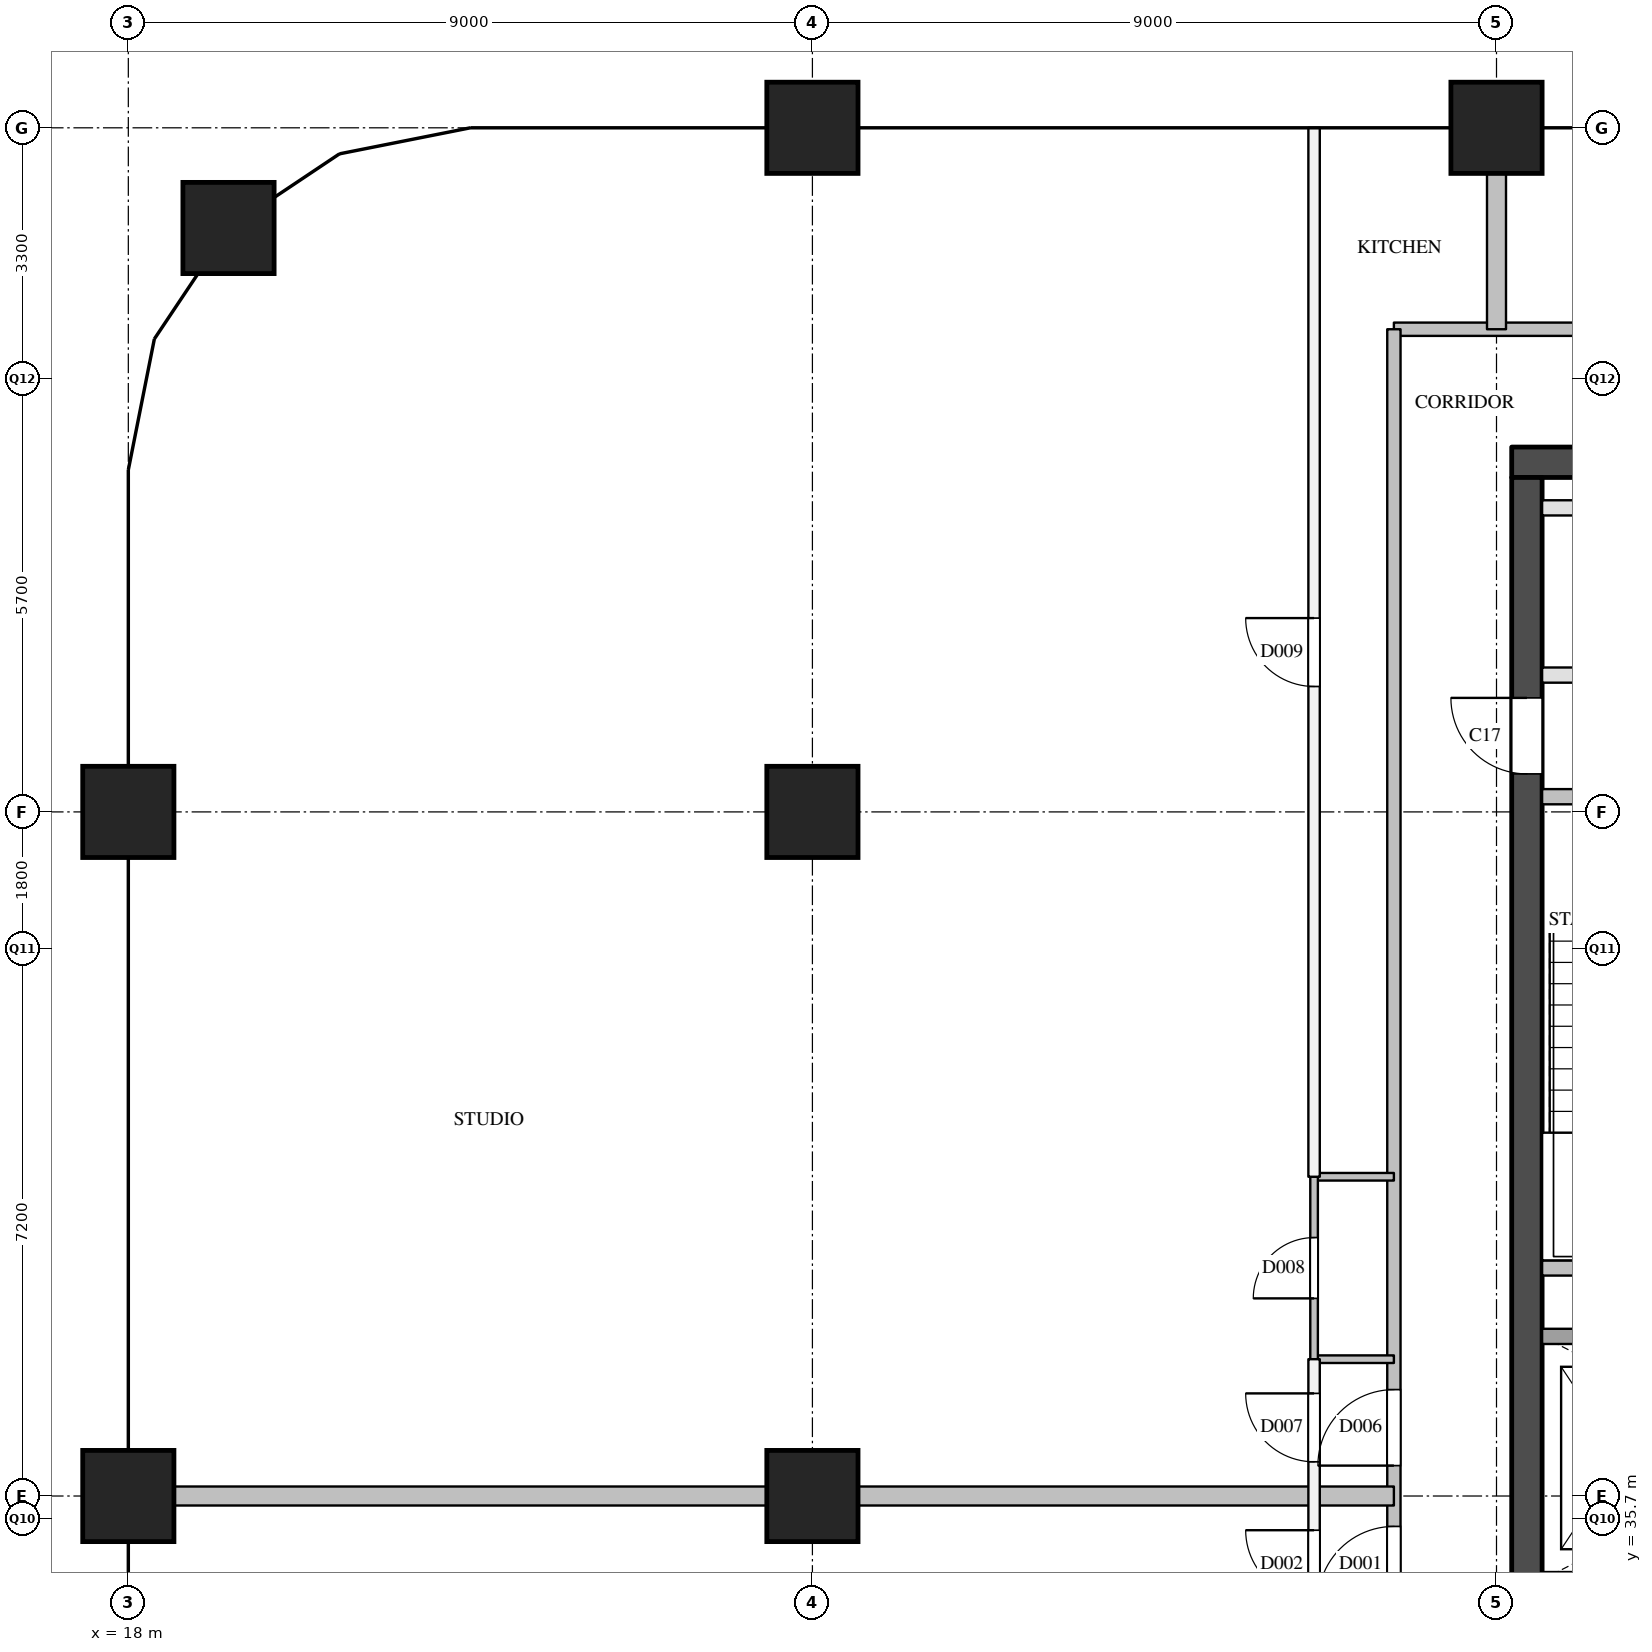
"""IFC4 building model, lengths in metres.
Left out: names, types, materials, properties, quantities, classifications, styles, units other than length and angle.
Written with IfcOpenShell. Run it as: python <this file> out.ifc"""

import sys

from ifc_helpers import new_model, si_unit, direction, frame, frame_2d, origin, origin_2d, place, context, subcontext, project, spatial, rectangle, extrude, element, fill, save


model = new_model("IFC4")
c1 = context("Model", 3, precision=1e-05, world=origin(), true_north=direction((0.0, 1.0)))
c2 = subcontext(c1, "Body", "Model", "MODEL_VIEW")
j1 = project(units=[si_unit("LENGTHUNIT", "METRE"), si_unit("PLANEANGLEUNIT", "RADIAN")], contexts=[c1])
p1 = place(None, origin())
s1 = spatial("IfcSite", under=j1, at=p1, CompositionType="ELEMENT")
p2 = place(p1, origin())
s2 = spatial("IfcBuilding", under=s1, at=p2, CompositionType="ELEMENT")
p3 = place(p2, frame((0.0, 0.0, 273.5)))
s3 = spatial("IfcBuildingStorey", under=s2, at=p3, CompositionType="ELEMENT", Elevation=273.5)
for number, where, z_axis, x_axis in (
    (1, (18.0, 36.0, 0.0), (0.0, 0.0, 1.0), (1.0, 0.0, 0.0)),
    (2, (18.0, 45.0, 0.0), (0.0, 0.0, 1.0), (1.0, 0.0, 0.0)),
    (3, (19.318, 52.682, 0.0), (0.0, 0.0, 1.0), (1.0, 0.0, 0.0)),
    (4, (27.0, 36.0, 0.0), (0.0, 0.0, 1.0), (1.0, 0.0, 0.0)),
    (5, (27.0, 45.0, 0.0), (0.0, 0.0, 1.0), (1.0, 0.0, 0.0)),
    (6, (27.0, 54.0, 0.0), (0.0, 0.0, 1.0), (1.0, 0.0, 0.0)),
    (7, (36.0, 54.0, 0.0), (0.0, 0.0, 1.0), (1.0, 0.0, 0.0)),
):
    element("IfcColumn", number, at=place(p3, frame(where, z_axis=z_axis, x_axis=x_axis)), inside=s3, PredefinedType="COLUMN", context=c2, shape_type="SweptSolid", body=[
        extrude(rectangle(XDim=1.2, YDim=1.2, at=origin_2d()), origin(), (0.0, 0.0, 1.0), 3.9),
    ])
p4 = place(p3, frame((36.2, 49.6, 0.0), z_axis=(0.0, 0.0, 1.0), x_axis=(1.0, 0.0, 0.0)))
e8 = element("IfcWall", 8, at=p4, inside=s3, PredefinedType="SHEAR", context=c2, shape_type="SweptSolid", body=[
    extrude(rectangle(XDim=12.0, YDim=0.4, at=frame_2d((6.0, 0.0))), origin(), (0.0, 0.0, 1.0), 3.6),
])
p5 = place(p3, frame((36.4, 29.1, 0.0), z_axis=(0.0, 0.0, 1.0), x_axis=(0.0, 1.0, 0.0)))
e9 = element("IfcWall", 9, at=p5, inside=s3, PredefinedType="SHEAR", context=c2, shape_type="SweptSolid", body=[
    extrude(rectangle(XDim=20.3, YDim=0.4, at=frame_2d((10.15, 0.0))), origin(), (0.0, 0.0, 1.0), 3.6),
])
p6 = place(p5, frame((3.6, 0.0, 0.0)))
e10 = element("IfcOpeningElement", 10, at=p6, cuts=e9, PredefinedType="OPENING", context=c2, shape_type="SweptSolid", body=[
    extrude(rectangle(XDim=1.8, YDim=2.1, at=frame_2d((0.9, 1.05))), frame((0.0, 0.21, 0.0), z_axis=(0.0, -1.0, 0.0), x_axis=(1.0, 0.0, 0.0)), (0.0, 0.0, 1.0), 0.42),
])
p7 = place(p5, frame((16.4, 0.0, 0.0)))
e11 = element("IfcOpeningElement", 11, at=p7, cuts=e9, PredefinedType="OPENING", context=c2, shape_type="SweptSolid", body=[
    extrude(rectangle(XDim=1.0, YDim=2.1, at=frame_2d((0.5, 1.05))), frame((0.0, 0.21, 0.0), z_axis=(0.0, -1.0, 0.0), x_axis=(1.0, 0.0, 0.0)), (0.0, 0.0, 1.0), 0.42),
])
p8 = place(p3, frame((36.6, 38.1, 0.0), z_axis=(0.0, 0.0, 1.0), x_axis=(1.0, 0.0, 0.0)))
e12 = element("IfcWall", 12, at=p8, inside=s3, PredefinedType="SOLIDWALL", context=c2, shape_type="SweptSolid", body=[
    extrude(rectangle(XDim=6.7, YDim=0.2, at=frame_2d((3.35, 0.0))), origin(), (0.0, 0.0, 1.0), 3.6),
])
p9 = place(p8, frame((0.45, 0.0, 0.0)))
e13 = element("IfcOpeningElement", 13, at=p9, cuts=e12, PredefinedType="OPENING", context=c2, shape_type="SweptSolid", body=[
    extrude(rectangle(XDim=1.2, YDim=2.1, at=frame_2d((0.6, 1.05))), frame((0.0, 0.11, 0.0), z_axis=(0.0, -1.0, 0.0), x_axis=(1.0, 0.0, 0.0)), (0.0, 0.0, 1.0), 0.22),
])
p10 = place(p8, frame((2.55, 0.0, 0.0)))
e14 = element("IfcOpeningElement", 14, at=p10, cuts=e12, PredefinedType="OPENING", context=c2, shape_type="SweptSolid", body=[
    extrude(rectangle(XDim=1.2, YDim=2.1, at=frame_2d((0.6, 1.05))), frame((0.0, 0.11, 0.0), z_axis=(0.0, -1.0, 0.0), x_axis=(1.0, 0.0, 0.0)), (0.0, 0.0, 1.0), 0.22),
])
p11 = place(p8, frame((4.65, 0.0, 0.0)))
e15 = element("IfcOpeningElement", 15, at=p11, cuts=e12, PredefinedType="OPENING", context=c2, shape_type="SweptSolid", body=[
    extrude(rectangle(XDim=1.2, YDim=2.1, at=frame_2d((0.6, 1.05))), frame((0.0, 0.11, 0.0), z_axis=(0.0, -1.0, 0.0), x_axis=(1.0, 0.0, 0.0)), (0.0, 0.0, 1.0), 0.22),
])
p12 = place(p3, frame((36.6, 39.0, 0.0), z_axis=(0.0, 0.0, 1.0), x_axis=(1.0, 0.0, 0.0)))
e16 = element("IfcWall", 16, at=p12, inside=s3, PredefinedType="SOLIDWALL", context=c2, shape_type="SweptSolid", body=[
    extrude(rectangle(XDim=3.25, YDim=0.2, at=frame_2d((1.625, 0.0))), origin(), (0.0, 0.0, 1.0), 3.6),
])
p13 = place(p3, frame((36.6, 45.2, 0.0), z_axis=(0.0, 0.0, 1.0), x_axis=(1.0, 0.0, 0.0)))
e17 = element("IfcWall", 17, at=p13, inside=s3, PredefinedType="SOLIDWALL", context=c2, shape_type="SweptSolid", body=[
    extrude(rectangle(XDim=10.05, YDim=0.2, at=frame_2d((5.025, 0.0))), origin(), (0.0, 0.0, 1.0), 3.6),
])
p14 = place(p13, frame((1.125, 0.0, 0.0)))
e18 = element("IfcOpeningElement", 18, at=p14, cuts=e17, PredefinedType="OPENING", context=c2, shape_type="SweptSolid", body=[
    extrude(rectangle(XDim=1.1, YDim=2.1, at=frame_2d((0.55, 1.05))), frame((0.0, 0.11, 0.0), z_axis=(0.0, -1.0, 0.0), x_axis=(1.0, 0.0, 0.0)), (0.0, 0.0, 1.0), 0.22),
])
p15 = place(p13, frame((4.475, 0.0, 0.0)))
e19 = element("IfcOpeningElement", 19, at=p15, cuts=e17, PredefinedType="OPENING", context=c2, shape_type="SweptSolid", body=[
    extrude(rectangle(XDim=1.1, YDim=2.1, at=frame_2d((0.55, 1.05))), frame((0.0, 0.11, 0.0), z_axis=(0.0, -1.0, 0.0), x_axis=(1.0, 0.0, 0.0)), (0.0, 0.0, 1.0), 0.22),
])
p16 = place(p13, frame((7.825, 0.0, 0.0)))
e20 = element("IfcOpeningElement", 20, at=p16, cuts=e17, PredefinedType="OPENING", context=c2, shape_type="SweptSolid", body=[
    extrude(rectangle(XDim=1.1, YDim=2.1, at=frame_2d((0.55, 1.05))), frame((0.0, 0.11, 0.0), z_axis=(0.0, -1.0, 0.0), x_axis=(1.0, 0.0, 0.0)), (0.0, 0.0, 1.0), 0.22),
])
p17 = place(p3, frame((36.6, 46.8, 0.0), z_axis=(0.0, 0.0, 1.0), x_axis=(1.0, 0.0, 0.0)))
e21 = element("IfcWall", 21, at=p17, inside=s3, PredefinedType="PARTITIONING", context=c2, shape_type="SweptSolid", body=[
    extrude(rectangle(XDim=11.2, YDim=0.2, at=frame_2d((5.6, 0.0))), origin(), (0.0, 0.0, 1.0), 3.6),
])
p18 = place(p17, frame((5.15, 0.0, 0.0)))
e22 = element("IfcOpeningElement", 22, at=p18, cuts=e21, PredefinedType="OPENING", context=c2, shape_type="SweptSolid", body=[
    extrude(rectangle(XDim=0.9, YDim=2.1, at=frame_2d((0.45, 1.05))), frame((0.0, 0.11, 0.0), z_axis=(0.0, -1.0, 0.0), x_axis=(1.0, 0.0, 0.0)), (0.0, 0.0, 1.0), 0.22),
])
p19 = place(p3, frame((36.6, 49.0, 0.0), z_axis=(0.0, 0.0, 1.0), x_axis=(1.0, 0.0, 0.0)))
e23 = element("IfcWall", 23, at=p19, inside=s3, PredefinedType="PARTITIONING", context=c2, shape_type="SweptSolid", body=[
    extrude(rectangle(XDim=11.2, YDim=0.2, at=frame_2d((5.6, 0.0))), origin(), (0.0, 0.0, 1.0), 3.6),
])
p20 = place(p3, frame((34.65, 51.35, 0.0), z_axis=(0.0, 0.0, 1.0), x_axis=(1.0, 0.0, 0.0)))
e24 = element("IfcWall", 24, at=p20, inside=s3, PredefinedType="PARTITIONING", context=c2, shape_type="SweptSolid", body=[
    extrude(rectangle(XDim=15.1, YDim=0.175, at=frame_2d((7.55, 0.0))), origin(), (0.0, 0.0, 1.0), 3.6),
])
p21 = place(p20, frame((6.407, 0.0, 0.0)))
e25 = element("IfcOpeningElement", 25, at=p21, cuts=e24, PredefinedType="OPENING", context=c2, shape_type="SweptSolid", body=[
    extrude(rectangle(XDim=1.0, YDim=2.1, at=frame_2d((0.5, 1.05))), frame((0.0, 0.097, 0.0), z_axis=(0.0, -1.0, 0.0), x_axis=(1.0, 0.0, 0.0)), (0.0, 0.0, 1.0), 0.195),
])
p22 = place(p3, frame((34.65, 28.5, 0.0), z_axis=(0.0, 0.0, 1.0), x_axis=(0.0, 1.0, 0.0)))
e26 = element("IfcWall", 26, at=p22, inside=s3, PredefinedType="PARTITIONING", context=c2, shape_type="SweptSolid", body=[
    extrude(rectangle(XDim=22.85, YDim=0.175, at=frame_2d((11.425, 0.0))), origin(), (0.0, 0.0, 1.0), 3.6),
])
p23 = place(p22, frame((6.1, 0.0, 0.0)))
e27 = element("IfcOpeningElement", 27, at=p23, cuts=e26, PredefinedType="OPENING", context=c2, shape_type="SweptSolid", body=[
    extrude(rectangle(XDim=1.0, YDim=2.1, at=frame_2d((0.5, 1.05))), frame((0.0, 0.097, 0.0), z_axis=(0.0, -1.0, 0.0), x_axis=(1.0, 0.0, 0.0)), (0.0, 0.0, 1.0), 0.195),
])
p24 = place(p22, frame((7.9, 0.0, 0.0)))
e28 = element("IfcOpeningElement", 28, at=p24, cuts=e26, PredefinedType="OPENING", context=c2, shape_type="SweptSolid", body=[
    extrude(rectangle(XDim=1.0, YDim=2.1, at=frame_2d((0.5, 1.05))), frame((0.0, 0.097, 0.0), z_axis=(0.0, -1.0, 0.0), x_axis=(1.0, 0.0, 0.0)), (0.0, 0.0, 1.0), 0.195),
])
p25 = place(p3, frame((33.6, 34.2, 0.0), z_axis=(0.0, 0.0, 1.0), x_axis=(0.0, 1.0, 0.0)))
e29 = element("IfcWall", 29, at=p25, inside=s3, PredefinedType="PARTITIONING", context=c2, shape_type="SweptSolid", body=[
    extrude(rectangle(XDim=3.6, YDim=0.15, at=frame_2d((1.8, 0.0))), origin(), (0.0, 0.0, 1.0), 3.6),
])
p26 = place(p25, frame((0.45, 0.0, 0.0)))
e30 = element("IfcOpeningElement", 30, at=p26, cuts=e29, PredefinedType="OPENING", context=c2, shape_type="SweptSolid", body=[
    extrude(rectangle(XDim=0.9, YDim=2.1, at=frame_2d((0.45, 1.05))), frame((0.0, 0.085, 0.0), z_axis=(0.0, -1.0, 0.0), x_axis=(1.0, 0.0, 0.0)), (0.0, 0.0, 1.0), 0.17),
])
p27 = place(p25, frame((2.25, 0.0, 0.0)))
e31 = element("IfcOpeningElement", 31, at=p27, cuts=e29, PredefinedType="OPENING", context=c2, shape_type="SweptSolid", body=[
    extrude(rectangle(XDim=0.9, YDim=2.1, at=frame_2d((0.45, 1.05))), frame((0.0, 0.085, 0.0), z_axis=(0.0, -1.0, 0.0), x_axis=(1.0, 0.0, 0.0)), (0.0, 0.0, 1.0), 0.17),
])
p28 = place(p3, frame((33.6, 40.2, 0.0), z_axis=(0.0, 0.0, 1.0), x_axis=(0.0, 1.0, 0.0)))
e32 = element("IfcWall", 32, at=p28, inside=s3, PredefinedType="PARTITIONING", context=c2, shape_type="SweptSolid", body=[
    extrude(rectangle(XDim=13.8, YDim=0.15, at=frame_2d((6.9, 0.0))), origin(), (0.0, 0.0, 1.0), 2.6),
])
p29 = place(p28, frame((6.45, 0.0, 0.0)))
e33 = element("IfcOpeningElement", 33, at=p29, cuts=e32, PredefinedType="OPENING", context=c2, shape_type="SweptSolid", body=[
    extrude(rectangle(XDim=0.9, YDim=2.1, at=frame_2d((0.45, 1.05))), frame((0.0, 0.085, 0.0), z_axis=(0.0, -1.0, 0.0), x_axis=(1.0, 0.0, 0.0)), (0.0, 0.0, 1.0), 0.17),
])
p30 = place(p3, frame((18.0, 36.0, 0.0), z_axis=(0.0, 0.0, 1.0), x_axis=(1.0, 0.0, 0.0)))
e34 = element("IfcWall", 34, at=p30, inside=s3, PredefinedType="PARTITIONING", context=c2, shape_type="SweptSolid", body=[
    extrude(rectangle(XDim=16.65, YDim=0.25, at=frame_2d((8.325, 0.0))), origin(), (0.0, 0.0, 1.0), 3.6),
])
p31 = place(p3, frame((36.0, 51.35, 0.0), z_axis=(0.0, 0.0, 1.0), x_axis=(0.0, 1.0, 0.0)))
e35 = element("IfcWall", 35, at=p31, inside=s3, PredefinedType="PARTITIONING", context=c2, shape_type="SweptSolid", body=[
    extrude(rectangle(XDim=2.65, YDim=0.25, at=frame_2d((1.325, 0.0))), origin(), (0.0, 0.0, 1.0), 3.6),
])
for number, where, z_axis, x_axis in (
    (36, (33.6, 37.8, 0.0), (0.0, 0.0, 1.0), (1.0, 0.0, 0.0)),
    (37, (33.6, 40.2, 0.0), (0.0, 0.0, 1.0), (1.0, 0.0, 0.0)),
):
    element("IfcWall", number, at=place(p3, frame(where, z_axis=z_axis, x_axis=x_axis)), inside=s3, PredefinedType="PARTITIONING", context=c2, shape_type="SweptSolid", body=[
        extrude(rectangle(XDim=1.05, YDim=0.1, at=frame_2d((0.525, 0.0))), origin(), (0.0, 0.0, 1.0), 3.6),
    ])
p32 = place(p3, frame((33.6, 37.8, 0.0), z_axis=(0.0, 0.0, 1.0), x_axis=(0.0, 1.0, 0.0)))
e38 = element("IfcWall", 38, at=p32, inside=s3, PredefinedType="PARTITIONING", context=c2, shape_type="SweptSolid", body=[
    extrude(rectangle(XDim=2.4, YDim=0.1, at=frame_2d((1.2, 0.0))), origin(), (0.0, 0.0, 1.0), 3.6),
])
p33 = place(p32, frame((0.8, 0.0, 0.0)))
e39 = element("IfcOpeningElement", 39, at=p33, cuts=e38, PredefinedType="OPENING", context=c2, shape_type="SweptSolid", body=[
    extrude(rectangle(XDim=0.8, YDim=2.1, at=frame_2d((0.4, 1.05))), frame((0.0, 0.06, 0.0), z_axis=(0.0, -1.0, 0.0), x_axis=(1.0, 0.0, 0.0)), (0.0, 0.0, 1.0), 0.12),
])
p34 = place(p7, origin())
e40 = element("IfcDoor", 40, at=p34, inside=s3, OperationType="SINGLE_SWING_RIGHT", PredefinedType="DOOR", context=c2, shape_type="SweptSolid", body=[
    extrude(rectangle(XDim=1.0, YDim=2.1, at=frame_2d((0.5, 1.05))), frame((0.0, 0.025, 0.0), z_axis=(0.0, -1.0, 0.0), x_axis=(1.0, 0.0, 0.0)), (0.0, 0.0, 1.0), 0.05),
])
fill(e11, e40)
p35 = place(p23, origin())
e41 = element("IfcDoor", 41, at=p35, inside=s3, OperationType="SINGLE_SWING_LEFT", PredefinedType="DOOR", context=c2, shape_type="SweptSolid", body=[
    extrude(rectangle(XDim=1.0, YDim=2.1, at=frame_2d((0.5, 1.05))), frame((0.0, 0.025, 0.0), z_axis=(0.0, -1.0, 0.0), x_axis=(1.0, 0.0, 0.0)), (0.0, 0.0, 1.0), 0.05),
])
fill(e27, e41)
p36 = place(p26, origin())
e42 = element("IfcDoor", 42, at=p36, inside=s3, OperationType="SINGLE_SWING_RIGHT", PredefinedType="DOOR", context=c2, shape_type="SweptSolid", body=[
    extrude(rectangle(XDim=0.9, YDim=2.1, at=frame_2d((0.45, 1.05))), frame((0.0, 0.025, 0.0), z_axis=(0.0, -1.0, 0.0), x_axis=(1.0, 0.0, 0.0)), (0.0, 0.0, 1.0), 0.05),
])
fill(e30, e42)
p37 = place(p24, origin())
e43 = element("IfcDoor", 43, at=p37, inside=s3, OperationType="SINGLE_SWING_LEFT", PredefinedType="DOOR", context=c2, shape_type="SweptSolid", body=[
    extrude(rectangle(XDim=1.0, YDim=2.1, at=frame_2d((0.5, 1.05))), frame((0.0, 0.025, 0.0), z_axis=(0.0, -1.0, 0.0), x_axis=(1.0, 0.0, 0.0)), (0.0, 0.0, 1.0), 0.05),
])
fill(e28, e43)
p38 = place(p27, origin())
e44 = element("IfcDoor", 44, at=p38, inside=s3, OperationType="SINGLE_SWING_RIGHT", PredefinedType="DOOR", context=c2, shape_type="SweptSolid", body=[
    extrude(rectangle(XDim=0.9, YDim=2.1, at=frame_2d((0.45, 1.05))), frame((0.0, 0.025, 0.0), z_axis=(0.0, -1.0, 0.0), x_axis=(1.0, 0.0, 0.0)), (0.0, 0.0, 1.0), 0.05),
])
fill(e31, e44)
p39 = place(p33, origin())
e45 = element("IfcDoor", 45, at=p39, inside=s3, OperationType="SINGLE_SWING_LEFT", PredefinedType="DOOR", context=c2, shape_type="SweptSolid", body=[
    extrude(rectangle(XDim=0.8, YDim=2.1, at=frame_2d((0.4, 1.05))), frame((0.0, 0.025, 0.0), z_axis=(0.0, -1.0, 0.0), x_axis=(1.0, 0.0, 0.0)), (0.0, 0.0, 1.0), 0.05),
])
fill(e39, e45)
p40 = place(p29, origin())
e46 = element("IfcDoor", 46, at=p40, inside=s3, OperationType="SINGLE_SWING_RIGHT", PredefinedType="DOOR", context=c2, shape_type="SweptSolid", body=[
    extrude(rectangle(XDim=0.9, YDim=2.1, at=frame_2d((0.45, 1.05))), frame((0.0, 0.025, 0.0), z_axis=(0.0, -1.0, 0.0), x_axis=(1.0, 0.0, 0.0)), (0.0, 0.0, 1.0), 0.05),
])
fill(e33, e46)
save(model, sys.argv[1])
